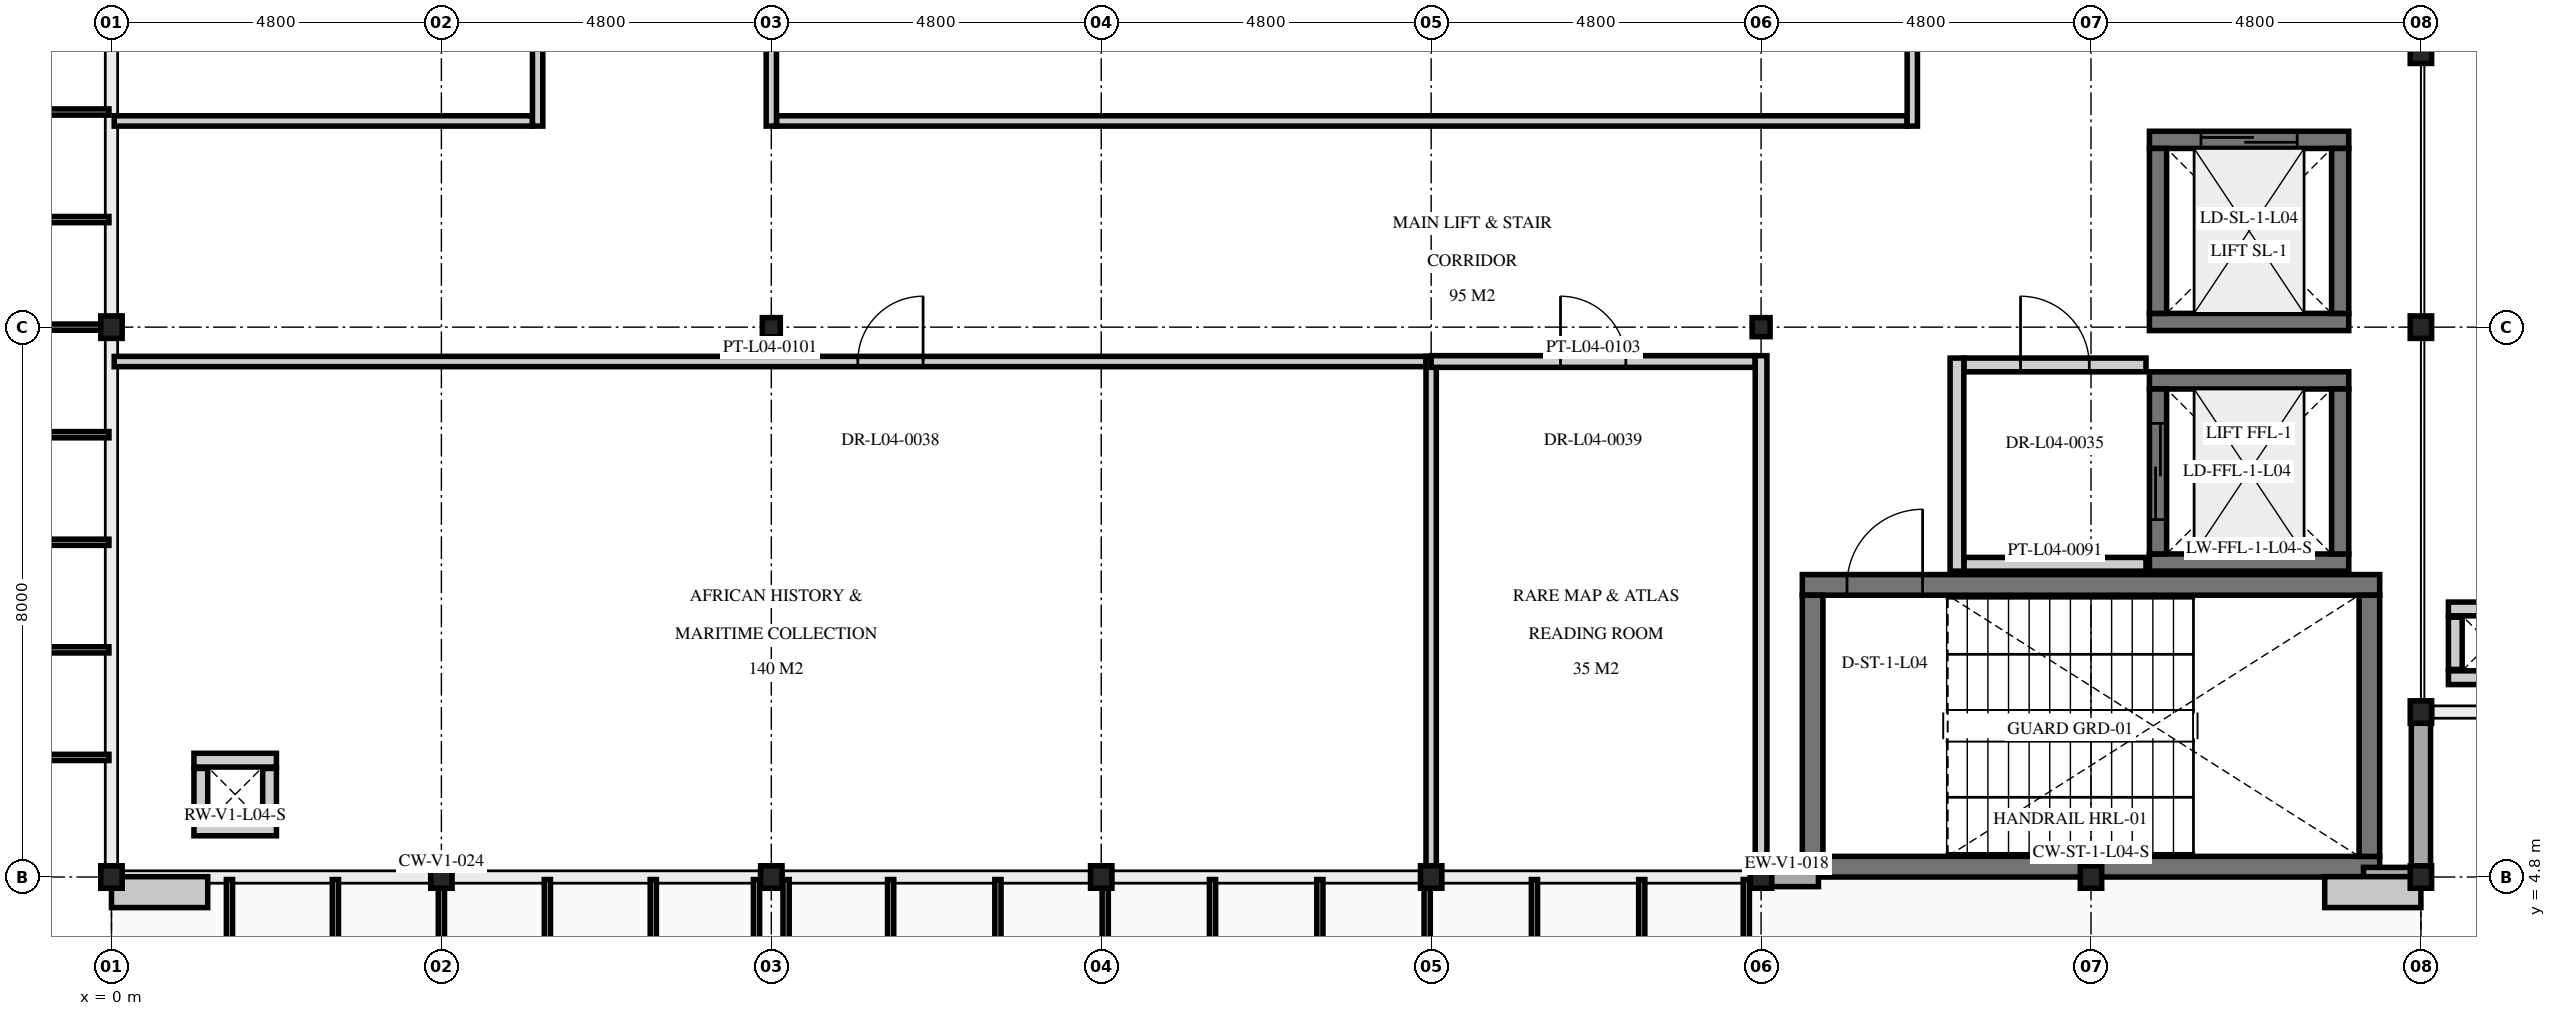
"""IFC4 building model, lengths in metres.
Left out: names, types, materials, properties, quantities, classifications, styles, units other than length and angle.
Written with IfcOpenShell. Run it as: python <this file> out.ifc"""

import sys

from ifc_helpers import new_model, si_unit, direction, frame, frame_2d, origin, origin_2d, place, context, subcontext, project, spatial, rectangle, i_section, extrude, element, fill, save


model = new_model("IFC4")
c1 = context("Model", 3, precision=1e-05, world=origin(), true_north=direction((0.0, 1.0)))
c2 = subcontext(c1, "Body", "Model", "MODEL_VIEW")
j1 = project(units=[si_unit("LENGTHUNIT", "METRE"), si_unit("PLANEANGLEUNIT", "RADIAN")], contexts=[c1])
p1 = place(None, origin())
s1 = spatial("IfcSite", under=j1, at=p1, CompositionType="ELEMENT")
p2 = place(p1, origin())
s2 = spatial("IfcBuilding", under=s1, at=p2, CompositionType="ELEMENT")
p3 = place(p2, frame((0.0, 0.0, 18.6)))
s3 = spatial("IfcBuildingStorey", under=s2, at=p3, CompositionType="ELEMENT", Elevation=18.6)
for number, where, z_axis, x_axis in (
    (1, (0.0, 4.8, 0.0), (0.0, 0.0, 1.0), (1.0, 0.0, 0.0)),
    (2, (4.8, 4.8, 0.0), (0.0, 0.0, 1.0), (1.0, 0.0, 0.0)),
    (3, (9.6, 4.8, 0.0), (0.0, 0.0, 1.0), (1.0, 0.0, 0.0)),
    (4, (14.4, 4.8, 0.0), (0.0, 0.0, 1.0), (1.0, 0.0, 0.0)),
    (5, (19.2, 4.8, 0.0), (0.0, 0.0, 1.0), (1.0, 0.0, 0.0)),
    (6, (24.0, 4.8, 0.0), (0.0, 0.0, 1.0), (1.0, 0.0, 0.0)),
    (7, (28.8, 4.8, 0.0), (0.0, 0.0, 1.0), (1.0, 0.0, 0.0)),
    (8, (33.6, 4.8, 0.0), (0.0, 0.0, 1.0), (1.0, 0.0, 0.0)),
    (9, (0.0, 12.8, 0.0), (0.0, 0.0, 1.0), (1.0, 0.0, 0.0)),
    (10, (33.6, 7.2, 0.0), (0.0, 0.0, 1.0), (1.0, 0.0, 0.0)),
    (11, (33.6, 12.8, 0.0), (0.0, 0.0, 1.0), (1.0, 0.0, 0.0)),
    (12, (33.6, 16.8, 0.0), (0.0, 0.0, 1.0), (1.0, 0.0, 0.0)),
):
    element("IfcColumn", number, at=place(p3, frame(where, z_axis=z_axis, x_axis=x_axis)), inside=s3, PredefinedType="COLUMN", context=c2, shape_type="SweptSolid", body=[
        extrude(i_section(OverallWidth=0.311, OverallDepth=0.327, WebThickness=0.016, FlangeThickness=0.025, at=origin_2d()), origin(), (0.0, 0.0, 1.0), 4.5),
    ])
for number, where, z_axis, x_axis in (
    (13, (9.6, 12.8, 0.0), (0.0, 0.0, 1.0), (1.0, 0.0, 0.0)),
    (14, (24.0, 12.8, 0.0), (0.0, 0.0, 1.0), (1.0, 0.0, 0.0)),
):
    element("IfcColumn", number, at=place(p3, frame(where, z_axis=z_axis, x_axis=x_axis)), inside=s3, PredefinedType="COLUMN", context=c2, shape_type="SweptSolid", body=[
        extrude(i_section(OverallWidth=0.261, OverallDepth=0.276, WebThickness=0.015, FlangeThickness=0.025, at=origin_2d()), origin(), (0.0, 0.0, 1.0), 4.5),
    ])
p4 = place(p3, frame((33.0, 4.95, 0.0), z_axis=(0.0, 0.0, 1.0), x_axis=(-1.0, 0.0, 0.0)))
e15 = element("IfcWall", 15, at=p4, inside=s3, PredefinedType="SHEAR", context=c2, shape_type="SweptSolid", body=[
    extrude(rectangle(XDim=8.4, YDim=0.3, at=frame_2d((4.2, 0.0))), origin(), (0.0, 0.0, 1.0), 4.28),
])
p5 = place(p3, frame((24.6, 9.05, 0.0), z_axis=(0.0, 0.0, 1.0), x_axis=(1.0, 0.0, 0.0)))
e16 = element("IfcWall", 16, at=p5, inside=s3, PredefinedType="SHEAR", context=c2, shape_type="SweptSolid", body=[
    extrude(rectangle(XDim=8.4, YDim=0.3, at=frame_2d((4.2, 0.0))), origin(), (0.0, 0.0, 1.0), 4.28),
])
p6 = place(p5, frame((0.65, 0.0, 0.0)))
e17 = element("IfcOpeningElement", 17, at=p6, cuts=e16, PredefinedType="OPENING", context=c2, shape_type="SweptSolid", body=[
    extrude(rectangle(XDim=1.1, YDim=2.2, at=frame_2d((0.55, 1.1))), frame((0.0, 0.16, 0.0), z_axis=(0.0, -1.0, 0.0), x_axis=(1.0, 0.0, 0.0)), (0.0, 0.0, 1.0), 0.32),
])
for number, where, z_axis, x_axis in (
    (18, (24.75, 5.1, 0.0), (0.0, 0.0, 1.0), (0.0, 1.0, 0.0)),
    (19, (32.85, 8.9, 0.0), (0.0, 0.0, 1.0), (0.0, -1.0, 0.0)),
):
    element("IfcWall", number, at=place(p3, frame(where, z_axis=z_axis, x_axis=x_axis)), inside=s3, PredefinedType="SHEAR", context=c2, shape_type="SweptSolid", body=[
        extrude(rectangle(XDim=3.8, YDim=0.3, at=frame_2d((1.9, 0.0))), origin(), (0.0, 0.0, 1.0), 4.28),
    ])
for number, where, z_axis, x_axis in (
    (20, (32.55, 9.375, 0.0), (0.0, 0.0, 1.0), (-1.0, 0.0, 0.0)),
    (21, (29.65, 12.025, 0.0), (0.0, 0.0, 1.0), (1.0, 0.0, 0.0)),
):
    element("IfcWall", number, at=place(p3, frame(where, z_axis=z_axis, x_axis=x_axis)), inside=s3, PredefinedType="SHEAR", context=c2, shape_type="SweptSolid", body=[
        extrude(rectangle(XDim=2.9, YDim=0.25, at=frame_2d((1.45, 0.0))), origin(), (0.0, 0.0, 1.0), 4.28),
    ])
p7 = place(p3, frame((29.775, 9.5, 0.0), z_axis=(0.0, 0.0, 1.0), x_axis=(0.0, 1.0, 0.0)))
e22 = element("IfcWall", 22, at=p7, inside=s3, PredefinedType="SHEAR", context=c2, shape_type="SweptSolid", body=[
    extrude(rectangle(XDim=2.4, YDim=0.25, at=frame_2d((1.2, 0.0))), origin(), (0.0, 0.0, 1.0), 4.28),
])
p8 = place(p7, frame((0.5, 0.0, 0.0)))
e23 = element("IfcOpeningElement", 23, at=p8, cuts=e22, PredefinedType="OPENING", context=c2, shape_type="SweptSolid", body=[
    extrude(rectangle(XDim=1.4, YDim=2.2, at=frame_2d((0.7, 1.1))), frame((0.0, 0.135, 0.0), z_axis=(0.0, -1.0, 0.0), x_axis=(1.0, 0.0, 0.0)), (0.0, 0.0, 1.0), 0.27),
])
p9 = place(p3, frame((32.425, 11.9, 0.0), z_axis=(0.0, 0.0, 1.0), x_axis=(0.0, -1.0, 0.0)))
e24 = element("IfcWall", 24, at=p9, inside=s3, PredefinedType="SHEAR", context=c2, shape_type="SweptSolid", body=[
    extrude(rectangle(XDim=2.4, YDim=0.25, at=frame_2d((1.2, 0.0))), origin(), (0.0, 0.0, 1.0), 4.28),
])
p10 = place(p3, frame((32.55, 12.875, 0.0), z_axis=(0.0, 0.0, 1.0), x_axis=(-1.0, 0.0, 0.0)))
e25 = element("IfcWall", 25, at=p10, inside=s3, PredefinedType="SHEAR", context=c2, shape_type="SweptSolid", body=[
    extrude(rectangle(XDim=2.9, YDim=0.25, at=frame_2d((1.45, 0.0))), origin(), (0.0, 0.0, 1.0), 4.28),
])
p11 = place(p3, frame((29.65, 15.525, 0.0), z_axis=(0.0, 0.0, 1.0), x_axis=(1.0, 0.0, 0.0)))
e26 = element("IfcWall", 26, at=p11, inside=s3, PredefinedType="SHEAR", context=c2, shape_type="SweptSolid", body=[
    extrude(rectangle(XDim=2.9, YDim=0.25, at=frame_2d((1.45, 0.0))), origin(), (0.0, 0.0, 1.0), 4.28),
])
p12 = place(p11, frame((0.75, 0.0, 0.0)))
e27 = element("IfcOpeningElement", 27, at=p12, cuts=e26, PredefinedType="OPENING", context=c2, shape_type="SweptSolid", body=[
    extrude(rectangle(XDim=1.4, YDim=2.2, at=frame_2d((0.7, 1.1))), frame((0.0, 0.135, 0.0), z_axis=(0.0, -1.0, 0.0), x_axis=(1.0, 0.0, 0.0)), (0.0, 0.0, 1.0), 0.27),
])
for number, where, z_axis, x_axis in (
    (28, (29.775, 13.0, 0.0), (0.0, 0.0, 1.0), (0.0, 1.0, 0.0)),
    (29, (32.425, 15.4, 0.0), (0.0, 0.0, 1.0), (0.0, -1.0, 0.0)),
):
    element("IfcWall", number, at=place(p3, frame(where, z_axis=z_axis, x_axis=x_axis)), inside=s3, PredefinedType="SHEAR", context=c2, shape_type="SweptSolid", body=[
        extrude(rectangle(XDim=2.4, YDim=0.25, at=frame_2d((1.2, 0.0))), origin(), (0.0, 0.0, 1.0), 4.28),
    ])
for number, where, z_axis, x_axis in (
    (30, (2.4, 5.5, 0.0), (0.0, 0.0, 1.0), (-1.0, 0.0, 0.0)),
    (31, (1.2, 6.5, 0.0), (0.0, 0.0, 1.0), (1.0, 0.0, 0.0)),
):
    element("IfcWall", number, at=place(p3, frame(where, z_axis=z_axis, x_axis=x_axis)), inside=s3, PredefinedType="PARTITIONING", context=c2, shape_type="SweptSolid", body=[
        extrude(rectangle(XDim=1.2, YDim=0.2, at=frame_2d((0.6, 0.0))), origin(), (0.0, 0.0, 1.0), 3.78),
    ])
for number, where, z_axis, x_axis in (
    (32, (1.3, 5.62, 0.0), (0.0, 0.0, 1.0), (0.0, 1.0, 0.0)),
    (33, (2.3, 6.38, 0.0), (0.0, 0.0, 1.0), (0.0, -1.0, 0.0)),
):
    element("IfcWall", number, at=place(p3, frame(where, z_axis=z_axis, x_axis=x_axis)), inside=s3, PredefinedType="PARTITIONING", context=c2, shape_type="SweptSolid", body=[
        extrude(rectangle(XDim=0.76, YDim=0.2, at=frame_2d((0.38, 0.0))), origin(), (0.0, 0.0, 1.0), 3.78),
    ])
for number, where, z_axis, x_axis in (
    (34, (35.2, 7.7, 0.0), (0.0, 0.0, 1.0), (-1.0, 0.0, 0.0)),
    (35, (34.0, 8.7, 0.0), (0.0, 0.0, 1.0), (1.0, 0.0, 0.0)),
):
    element("IfcWall", number, at=place(p3, frame(where, z_axis=z_axis, x_axis=x_axis)), inside=s3, PredefinedType="PARTITIONING", context=c2, shape_type="SweptSolid", body=[
        extrude(rectangle(XDim=1.2, YDim=0.2, at=frame_2d((0.6, 0.0))), origin(), (0.0, 0.0, 1.0), 3.78),
    ])
p13 = place(p3, frame((34.1, 7.82, 0.0), z_axis=(0.0, 0.0, 1.0), x_axis=(0.0, 1.0, 0.0)))
e36 = element("IfcWall", 36, at=p13, inside=s3, PredefinedType="PARTITIONING", context=c2, shape_type="SweptSolid", body=[
    extrude(rectangle(XDim=0.76, YDim=0.2, at=frame_2d((0.38, 0.0))), origin(), (0.0, 0.0, 1.0), 3.78),
])
p14 = place(p3, frame((24.835, 4.8, 0.0), z_axis=(0.0, 0.0, 1.0), x_axis=(-1.0, 0.0, 0.0)))
e37 = element("IfcWall", 37, at=p14, inside=s3, PredefinedType="SOLIDWALL", context=c2, shape_type="SweptSolid", body=[
    extrude(rectangle(XDim=0.92, YDim=0.28, at=frame_2d((0.46, 0.0))), origin(), (0.0, 0.0, 1.0), 3.665),
])
p15 = place(p3, frame((33.685, 4.8, 0.0), z_axis=(0.0, 0.0, 1.0), x_axis=(-1.0, 0.0, 0.0)))
e38 = element("IfcWall", 38, at=p15, inside=s3, PredefinedType="SOLIDWALL", context=c2, shape_type="SweptSolid", body=[
    extrude(rectangle(XDim=0.92, YDim=0.28, at=frame_2d((0.46, 0.0))), origin(), (0.0, 0.0, 1.0), 3.665),
])
p16 = place(p3, frame((33.6, 7.285, 0.0), z_axis=(0.0, 0.0, 1.0), x_axis=(0.0, -1.0, 0.0)))
e39 = element("IfcWall", 39, at=p16, inside=s3, PredefinedType="SOLIDWALL", context=c2, shape_type="SweptSolid", body=[
    extrude(rectangle(XDim=2.57, YDim=0.28, at=frame_2d((1.285, 0.0))), origin(), (0.0, 0.0, 1.0), 3.665),
])
p17 = place(p3, frame((26.95, 9.35, 0.0), z_axis=(0.0, 0.0, 1.0), x_axis=(1.0, 0.0, 0.0)))
e40 = element("IfcWall", 40, at=p17, inside=s3, PredefinedType="PARTITIONING", context=c2, shape_type="SweptSolid", body=[
    extrude(rectangle(XDim=2.65, YDim=0.2, at=frame_2d((1.325, 0.0))), origin(), (0.0, 0.0, 1.0), 4.28),
])
p18 = place(p3, frame((26.95, 12.25, 0.0), z_axis=(0.0, 0.0, 1.0), x_axis=(1.0, 0.0, 0.0)))
e41 = element("IfcWall", 41, at=p18, inside=s3, PredefinedType="PARTITIONING", context=c2, shape_type="SweptSolid", body=[
    extrude(rectangle(XDim=2.65, YDim=0.2, at=frame_2d((1.325, 0.0))), origin(), (0.0, 0.0, 1.0), 4.28),
])
p19 = place(p18, frame((0.825, 0.0, 0.0)))
e42 = element("IfcOpeningElement", 42, at=p19, cuts=e41, PredefinedType="OPENING", context=c2, shape_type="SweptSolid", body=[
    extrude(rectangle(XDim=1.0, YDim=2.2, at=frame_2d((0.5, 1.1))), frame((0.0, 0.11, 0.0), z_axis=(0.0, -1.0, 0.0), x_axis=(1.0, 0.0, 0.0)), (0.0, 0.0, 1.0), 0.22),
])
p20 = place(p3, frame((26.85, 9.25, 0.0), z_axis=(0.0, 0.0, 1.0), x_axis=(0.0, 1.0, 0.0)))
e43 = element("IfcWall", 43, at=p20, inside=s3, PredefinedType="PARTITIONING", context=c2, shape_type="SweptSolid", body=[
    extrude(rectangle(XDim=3.1, YDim=0.2, at=frame_2d((1.55, 0.0))), origin(), (0.0, 0.0, 1.0), 4.28),
])
p21 = place(p3, frame((0.04, 12.3, 0.0), z_axis=(0.0, 0.0, 1.0), x_axis=(1.0, 0.0, 0.0)))
e44 = element("IfcWall", 44, at=p21, inside=s3, PredefinedType="PARTITIONING", context=c2, shape_type="SweptSolid", body=[
    extrude(rectangle(XDim=19.085, YDim=0.15, at=frame_2d((9.542, 0.0))), origin(), (0.0, 0.0, 1.0), 3.711),
])
p22 = place(p21, frame((10.818, 0.0, 0.0)))
e45 = element("IfcOpeningElement", 45, at=p22, cuts=e44, PredefinedType="OPENING", context=c2, shape_type="SweptSolid", body=[
    extrude(rectangle(XDim=0.95, YDim=2.15, at=frame_2d((0.475, 1.075))), frame((0.0, 0.085, 0.0), z_axis=(0.0, -1.0, 0.0), x_axis=(1.0, 0.0, 0.0)), (0.0, 0.0, 1.0), 0.17),
])
p23 = place(p3, frame((19.2, 4.84, 0.0), z_axis=(0.0, 0.0, 1.0), x_axis=(0.0, 1.0, 0.0)))
e46 = element("IfcWall", 46, at=p23, inside=s3, PredefinedType="PARTITIONING", context=c2, shape_type="SweptSolid", body=[
    extrude(rectangle(XDim=7.535, YDim=0.15, at=frame_2d((3.768, 0.0))), origin(), (0.0, 0.0, 1.0), 3.665),
])
p24 = place(p3, frame((19.2, 12.3, 0.0), z_axis=(0.0, 0.0, 1.0), x_axis=(1.0, 0.0, 0.0)))
e47 = element("IfcWall", 47, at=p24, inside=s3, PredefinedType="PARTITIONING", context=c2, shape_type="SweptSolid", body=[
    extrude(rectangle(XDim=4.715, YDim=0.17, at=frame_2d((2.357, 0.0))), origin(), (0.0, 0.0, 1.0), 3.711),
])
p25 = place(p24, frame((1.882, 0.0, 0.0)))
e48 = element("IfcOpeningElement", 48, at=p25, cuts=e47, PredefinedType="OPENING", context=c2, shape_type="SweptSolid", body=[
    extrude(rectangle(XDim=0.95, YDim=2.15, at=frame_2d((0.475, 1.075))), frame((0.0, 0.095, 0.0), z_axis=(0.0, -1.0, 0.0), x_axis=(1.0, 0.0, 0.0)), (0.0, 0.0, 1.0), 0.19),
])
p26 = place(p3, frame((24.0, 4.84, 0.0), z_axis=(0.0, 0.0, 1.0), x_axis=(0.0, 1.0, 0.0)))
e49 = element("IfcWall", 49, at=p26, inside=s3, PredefinedType="PARTITIONING", context=c2, shape_type="SweptSolid", body=[
    extrude(rectangle(XDim=7.545, YDim=0.17, at=frame_2d((3.772, 0.0))), origin(), (0.0, 0.0, 1.0), 3.665),
])
p27 = place(p3, frame((0.04, 15.8, 0.0), z_axis=(0.0, 0.0, 1.0), x_axis=(1.0, 0.0, 0.0)))
e50 = element("IfcWall", 50, at=p27, inside=s3, PredefinedType="PARTITIONING", context=c2, shape_type="SweptSolid", body=[
    extrude(rectangle(XDim=6.085, YDim=0.15, at=frame_2d((3.042, 0.0))), origin(), (0.0, 0.0, 1.0), 3.711),
])
p28 = place(p3, frame((6.2, 15.725, 0.0), z_axis=(0.0, 0.0, 1.0), x_axis=(0.0, 1.0, 0.0)))
e51 = element("IfcWall", 51, at=p28, inside=s3, PredefinedType="PARTITIONING", context=c2, shape_type="SweptSolid", body=[
    extrude(rectangle(XDim=14.45, YDim=0.15, at=frame_2d((7.225, 0.0))), origin(), (0.0, 0.0, 1.0), 3.665),
])
p29 = place(p28, frame((6.75, 0.0, 0.0)))
e52 = element("IfcOpeningElement", 52, at=p29, cuts=e51, PredefinedType="OPENING", context=c2, shape_type="SweptSolid", body=[
    extrude(rectangle(XDim=0.95, YDim=2.15, at=frame_2d((0.475, 1.075))), frame((0.0, 0.085, 0.0), z_axis=(0.0, -1.0, 0.0), x_axis=(1.0, 0.0, 0.0)), (0.0, 0.0, 1.0), 0.17),
])
p30 = place(p3, frame((9.675, 15.8, 0.0), z_axis=(0.0, 0.0, 1.0), x_axis=(1.0, 0.0, 0.0)))
e53 = element("IfcWall", 53, at=p30, inside=s3, PredefinedType="PARTITIONING", context=c2, shape_type="SweptSolid", body=[
    extrude(rectangle(XDim=16.45, YDim=0.15, at=frame_2d((8.225, 0.0))), origin(), (0.0, 0.0, 1.0), 3.711),
])
p31 = place(p3, frame((9.6, 15.725, 0.0), z_axis=(0.0, 0.0, 1.0), x_axis=(0.0, 1.0, 0.0)))
e54 = element("IfcWall", 54, at=p31, inside=s3, PredefinedType="PARTITIONING", context=c2, shape_type="SweptSolid", body=[
    extrude(rectangle(XDim=21.035, YDim=0.15, at=frame_2d((10.518, 0.0))), origin(), (0.0, 0.0, 1.0), 3.665),
])
p32 = place(p31, frame((10.042, 0.0, 0.0)))
e55 = element("IfcOpeningElement", 55, at=p32, cuts=e54, PredefinedType="OPENING", context=c2, shape_type="SweptSolid", body=[
    extrude(rectangle(XDim=0.95, YDim=2.15, at=frame_2d((0.475, 1.075))), frame((0.0, 0.085, 0.0), z_axis=(0.0, -1.0, 0.0), x_axis=(1.0, 0.0, 0.0)), (0.0, 0.0, 1.0), 0.17),
])
p33 = place(p3, frame((26.2, 15.725, 0.0), z_axis=(0.0, 0.0, 1.0), x_axis=(0.0, 1.0, 0.0)))
e56 = element("IfcWall", 56, at=p33, inside=s3, PredefinedType="PARTITIONING", context=c2, shape_type="SweptSolid", body=[
    extrude(rectangle(XDim=21.035, YDim=0.15, at=frame_2d((10.518, 0.0))), origin(), (0.0, 0.0, 1.0), 3.665),
])
p34 = place(p6, origin())
e57 = element("IfcDoor", 57, at=p34, inside=s3, OperationType="SINGLE_SWING_RIGHT", PredefinedType="DOOR", context=c2, shape_type="SweptSolid", body=[
    extrude(rectangle(XDim=1.1, YDim=2.2, at=frame_2d((0.55, 1.1))), frame((0.0, 0.025, 0.0), z_axis=(0.0, -1.0, 0.0), x_axis=(1.0, 0.0, 0.0)), (0.0, 0.0, 1.0), 0.05),
])
fill(e17, e57)
p35 = place(p8, origin())
e58 = element("IfcDoor", 58, at=p35, inside=s3, OperationType="DOUBLE_DOOR_SLIDING", PredefinedType="DOOR", context=c2, shape_type="SweptSolid", body=[
    extrude(rectangle(XDim=1.4, YDim=2.2, at=frame_2d((0.7, 1.1))), frame((0.0, 0.025, 0.0), z_axis=(0.0, -1.0, 0.0), x_axis=(1.0, 0.0, 0.0)), (0.0, 0.0, 1.0), 0.05),
])
fill(e23, e58)
p36 = place(p12, origin())
e59 = element("IfcDoor", 59, at=p36, inside=s3, OperationType="DOUBLE_DOOR_SLIDING", PredefinedType="DOOR", context=c2, shape_type="SweptSolid", body=[
    extrude(rectangle(XDim=1.4, YDim=2.2, at=frame_2d((0.7, 1.1))), frame((0.0, 0.025, 0.0), z_axis=(0.0, -1.0, 0.0), x_axis=(1.0, 0.0, 0.0)), (0.0, 0.0, 1.0), 0.05),
])
fill(e27, e59)
p37 = place(p19, origin())
e60 = element("IfcDoor", 60, at=p37, inside=s3, OperationType="SINGLE_SWING_LEFT", PredefinedType="DOOR", context=c2, shape_type="SweptSolid", body=[
    extrude(rectangle(XDim=1.0, YDim=2.2, at=frame_2d((0.5, 1.1))), frame((0.0, 0.025, 0.0), z_axis=(0.0, -1.0, 0.0), x_axis=(1.0, 0.0, 0.0)), (0.0, 0.0, 1.0), 0.05),
])
fill(e42, e60)
p38 = place(p22, origin())
e61 = element("IfcDoor", 61, at=p38, inside=s3, OperationType="SINGLE_SWING_RIGHT", PredefinedType="DOOR", context=c2, shape_type="SweptSolid", body=[
    extrude(rectangle(XDim=0.95, YDim=2.15, at=frame_2d((0.475, 1.075))), frame((0.0, 0.025, 0.0), z_axis=(0.0, -1.0, 0.0), x_axis=(1.0, 0.0, 0.0)), (0.0, 0.0, 1.0), 0.05),
])
fill(e45, e61)
p39 = place(p25, origin())
e62 = element("IfcDoor", 62, at=p39, inside=s3, OperationType="SINGLE_SWING_LEFT", PredefinedType="DOOR", context=c2, shape_type="SweptSolid", body=[
    extrude(rectangle(XDim=0.95, YDim=2.15, at=frame_2d((0.475, 1.075))), frame((0.0, 0.025, 0.0), z_axis=(0.0, -1.0, 0.0), x_axis=(1.0, 0.0, 0.0)), (0.0, 0.0, 1.0), 0.05),
])
fill(e48, e62)
save(model, sys.argv[1])
